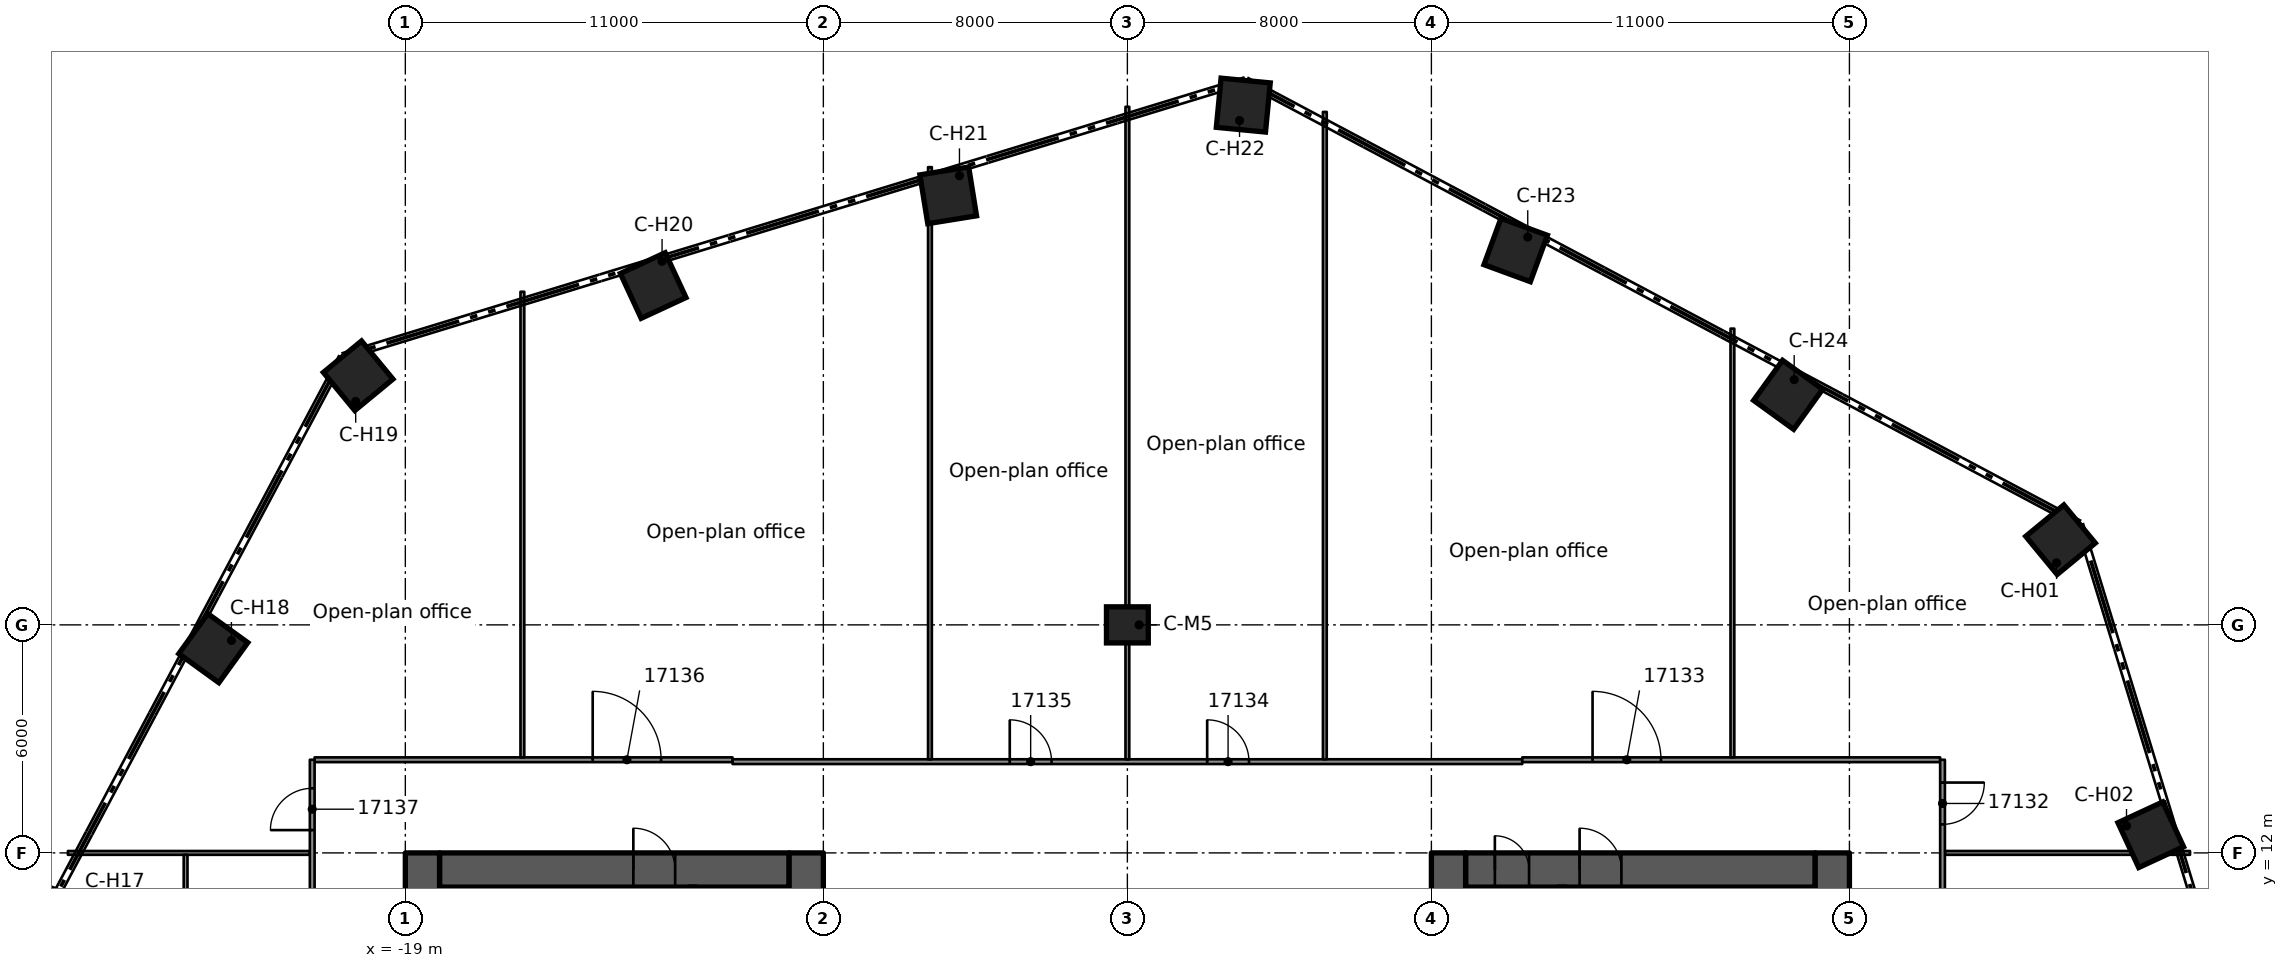
"""IFC4 building model, lengths in metres.
Left out: names, types, materials, properties, quantities, classifications, styles, units other than length and angle.
Written with IfcOpenShell. Run it as: python <this file> out.ifc"""

import sys

from ifc_helpers import new_model, si_unit, direction, frame, frame_2d, origin, origin_2d, place, context, subcontext, project, spatial, rectangle, extrude, element, fill, save


model = new_model("IFC4")
c1 = context("Model", 3, precision=1e-05, world=origin(), true_north=direction((0.0, 1.0)))
c2 = subcontext(c1, "Body", "Model", "MODEL_VIEW")
j1 = project(units=[si_unit("LENGTHUNIT", "METRE"), si_unit("PLANEANGLEUNIT", "RADIAN")], contexts=[c1])
p1 = place(None, origin())
s1 = spatial("IfcSite", under=j1, at=p1, CompositionType="ELEMENT")
p2 = place(p1, origin())
s2 = spatial("IfcBuilding", under=s1, at=p2, CompositionType="ELEMENT")
p3 = place(p2, frame((0.0, 0.0, 84.2)))
s3 = spatial("IfcBuildingStorey", under=s2, at=p3, CompositionType="ELEMENT", Elevation=84.2)
p4 = place(p3, frame((-18.1, 11.55, 0.0), z_axis=(0.0, 0.0, 1.0), x_axis=(1.0, 0.0, 0.0)))
e1 = element("IfcWall", 1, at=p4, inside=s3, PredefinedType="SHEAR", context=c2, shape_type="SweptSolid", body=[
    extrude(rectangle(XDim=9.2, YDim=0.9, at=frame_2d((4.6, 0.0))), origin(), (0.0, 0.0, 1.0), 3.5),
])
p5 = place(p4, frame((5.1, 0.0, 0.0)))
e2 = element("IfcOpeningElement", 2, at=p5, cuts=e1, PredefinedType="OPENING", context=c2, shape_type="SweptSolid", body=[
    extrude(rectangle(XDim=1.1, YDim=2.1, at=frame_2d((0.55, 1.05))), frame((0.0, 0.46, 0.0), z_axis=(0.0, -1.0, 0.0), x_axis=(1.0, 0.0, 0.0)), (0.0, 0.0, 1.0), 0.92),
])
p6 = place(p3, frame((-18.55, -12.0, 0.0), z_axis=(0.0, 0.0, 1.0), x_axis=(0.0, 1.0, 0.0)))
e3 = element("IfcWall", 3, at=p6, inside=s3, PredefinedType="SHEAR", context=c2, shape_type="SweptSolid", body=[
    extrude(rectangle(XDim=24.0, YDim=0.9, at=frame_2d((12.0, 0.0))), origin(), (0.0, 0.0, 1.0), 3.5),
])
p7 = place(p6, frame((10.1, 0.0, 0.0)))
e4 = element("IfcOpeningElement", 4, at=p7, cuts=e3, PredefinedType="OPENING", context=c2, shape_type="SweptSolid", body=[
    extrude(rectangle(XDim=1.8, YDim=2.1, at=frame_2d((0.9, 1.05))), frame((0.0, 0.46, 0.0), z_axis=(0.0, -1.0, 0.0), x_axis=(1.0, 0.0, 0.0)), (0.0, 0.0, 1.0), 0.92),
])
p8 = place(p3, frame((-8.45, -12.0, 0.0), z_axis=(0.0, 0.0, 1.0), x_axis=(0.0, 1.0, 0.0)))
e5 = element("IfcWall", 5, at=p8, inside=s3, PredefinedType="SHEAR", context=c2, shape_type="SweptSolid", body=[
    extrude(rectangle(XDim=24.0, YDim=0.9, at=frame_2d((12.0, 0.0))), origin(), (0.0, 0.0, 1.0), 3.5),
])
p9 = place(p8, frame((9.6, 0.0, 0.0)))
e6 = element("IfcOpeningElement", 6, at=p9, cuts=e5, PredefinedType="OPENING", context=c2, shape_type="SweptSolid", body=[
    extrude(rectangle(XDim=1.8, YDim=2.1, at=frame_2d((0.9, 1.05))), frame((0.0, 0.46, 0.0), z_axis=(0.0, -1.0, 0.0), x_axis=(1.0, 0.0, 0.0)), (0.0, 0.0, 1.0), 0.92),
])
p10 = place(p8, frame((19.65, 0.0, 0.0)))
e7 = element("IfcOpeningElement", 7, at=p10, cuts=e5, PredefinedType="OPENING", context=c2, shape_type="SweptSolid", body=[
    extrude(rectangle(XDim=1.1, YDim=2.1, at=frame_2d((0.55, 1.05))), frame((0.0, 0.46, 0.0), z_axis=(0.0, -1.0, 0.0), x_axis=(1.0, 0.0, 0.0)), (0.0, 0.0, 1.0), 0.92),
])
p11 = place(p3, frame((8.9, 11.55, 0.0), z_axis=(0.0, 0.0, 1.0), x_axis=(1.0, 0.0, 0.0)))
e8 = element("IfcWall", 8, at=p11, inside=s3, PredefinedType="SHEAR", context=c2, shape_type="SweptSolid", body=[
    extrude(rectangle(XDim=9.2, YDim=0.9, at=frame_2d((4.6, 0.0))), origin(), (0.0, 0.0, 1.0), 3.5),
])
p12 = place(p11, frame((3.0, 0.0, 0.0)))
e9 = element("IfcOpeningElement", 9, at=p12, cuts=e8, PredefinedType="OPENING", context=c2, shape_type="SweptSolid", body=[
    extrude(rectangle(XDim=1.1, YDim=2.1, at=frame_2d((0.55, 1.05))), frame((0.0, 0.46, 0.0), z_axis=(0.0, -1.0, 0.0), x_axis=(1.0, 0.0, 0.0)), (0.0, 0.0, 1.0), 0.92),
])
p13 = place(p11, frame((0.77, 0.0, 0.0)))
e10 = element("IfcOpeningElement", 10, at=p13, cuts=e8, PredefinedType="OPENING", context=c2, shape_type="SweptSolid", body=[
    extrude(rectangle(XDim=0.9, YDim=2.1, at=frame_2d((0.45, 1.05))), frame((0.0, 0.46, 0.0), z_axis=(0.0, -1.0, 0.0), x_axis=(1.0, 0.0, 0.0)), (0.0, 0.0, 1.0), 0.92),
])
p14 = place(p3, frame((8.45, -12.0, 0.0), z_axis=(0.0, 0.0, 1.0), x_axis=(0.0, 1.0, 0.0)))
e11 = element("IfcWall", 11, at=p14, inside=s3, PredefinedType="SHEAR", context=c2, shape_type="SweptSolid", body=[
    extrude(rectangle(XDim=24.0, YDim=0.9, at=frame_2d((12.0, 0.0))), origin(), (0.0, 0.0, 1.0), 3.5),
])
p15 = place(p14, frame((12.6, 0.0, 0.0)))
e12 = element("IfcOpeningElement", 12, at=p15, cuts=e11, PredefinedType="OPENING", context=c2, shape_type="SweptSolid", body=[
    extrude(rectangle(XDim=1.8, YDim=2.1, at=frame_2d((0.9, 1.05))), frame((0.0, 0.46, 0.0), z_axis=(0.0, -1.0, 0.0), x_axis=(1.0, 0.0, 0.0)), (0.0, 0.0, 1.0), 0.92),
])
p16 = place(p14, frame((3.25, 0.0, 0.0)))
e13 = element("IfcOpeningElement", 13, at=p16, cuts=e11, PredefinedType="OPENING", context=c2, shape_type="SweptSolid", body=[
    extrude(rectangle(XDim=1.1, YDim=2.1, at=frame_2d((0.55, 1.05))), frame((0.0, 0.46, 0.0), z_axis=(0.0, -1.0, 0.0), x_axis=(1.0, 0.0, 0.0)), (0.0, 0.0, 1.0), 0.92),
])
p17 = place(p3, frame((18.55, -12.0, 0.0), z_axis=(0.0, 0.0, 1.0), x_axis=(0.0, 1.0, 0.0)))
e14 = element("IfcWall", 14, at=p17, inside=s3, PredefinedType="SHEAR", context=c2, shape_type="SweptSolid", body=[
    extrude(rectangle(XDim=24.0, YDim=0.9, at=frame_2d((12.0, 0.0))), origin(), (0.0, 0.0, 1.0), 3.5),
])
p18 = place(p17, frame((12.1, 0.0, 0.0)))
e15 = element("IfcOpeningElement", 15, at=p18, cuts=e14, PredefinedType="OPENING", context=c2, shape_type="SweptSolid", body=[
    extrude(rectangle(XDim=1.8, YDim=2.1, at=frame_2d((0.9, 1.05))), frame((0.0, 0.46, 0.0), z_axis=(0.0, -1.0, 0.0), x_axis=(1.0, 0.0, 0.0)), (0.0, 0.0, 1.0), 0.92),
])
for number, where, z_axis, x_axis in (
    (16, (24.555, 20.241, 0.0), (0.0, 0.0, 1.0), (0.772, 0.636, 0.0)),
    (17, (26.929, 12.478, 0.0), (0.0, 0.0, 1.0), (0.907, 0.42, 0.0)),
    (18, (-24.053, 17.387, 0.0), (0.0, 0.0, 1.0), (-0.81, 0.586, 0.0)),
    (19, (-20.241, 24.555, 0.0), (0.0, 0.0, 1.0), (-0.636, 0.772, 0.0)),
    (20, (-12.478, 26.929, 0.0), (0.0, 0.0, 1.0), (-0.42, 0.907, 0.0)),
    (21, (-4.714, 29.302, 0.0), (0.0, 0.0, 1.0), (-0.159, 0.987, 0.0)),
    (22, (3.05, 31.676, 0.0), (0.0, 0.0, 1.0), (0.096, 0.995, 0.0)),
    (23, (10.218, 27.864, 0.0), (0.0, 0.0, 1.0), (0.344, 0.939, 0.0)),
    (24, (17.387, 24.053, 0.0), (0.0, 0.0, 1.0), (0.586, 0.81, 0.0)),
):
    element("IfcColumn", number, at=place(p3, frame(where, z_axis=z_axis, x_axis=x_axis)), inside=s3, PredefinedType="COLUMN", context=c2, shape_type="SweptSolid", body=[
        extrude(rectangle(XDim=1.3, YDim=1.3, at=origin_2d()), origin(), (0.0, 0.0, 1.0), 3.5),
    ])
p19 = place(p3, frame((0.0, 18.0, 0.0), z_axis=(0.0, 0.0, 1.0), x_axis=(1.0, 0.0, 0.0)))
e25 = element("IfcColumn", 25, at=p19, inside=s3, PredefinedType="COLUMN", context=c2, shape_type="SweptSolid", body=[
    extrude(rectangle(XDim=1.1, YDim=0.95, at=origin_2d()), origin(), (0.0, 0.0, 1.0), 3.5),
])
p20 = place(p3, frame((-11.44, 6.975, 0.0), z_axis=(0.0, 0.0, 1.0), x_axis=(0.0, 1.0, 0.0)))
e26 = element("IfcWall", 26, at=p20, inside=s3, PredefinedType="SOLIDWALL", context=c2, shape_type="SweptSolid", body=[
    extrude(rectangle(XDim=4.125, YDim=0.2, at=frame_2d((2.062, 0.0))), origin(), (0.0, 0.0, 1.0), 3.09),
])
p21 = place(p20, frame((2.1, 0.0, 0.0)))
e27 = element("IfcOpeningElement", 27, at=p21, cuts=e26, PredefinedType="OPENING", context=c2, shape_type="SweptSolid", body=[
    extrude(rectangle(XDim=1.1, YDim=2.1, at=frame_2d((0.55, 1.05))), frame((0.0, 0.11, 0.0), z_axis=(0.0, -1.0, 0.0), x_axis=(1.0, 0.0, 0.0)), (0.0, 0.0, 1.0), 0.22),
])
p22 = place(p3, frame((11.44, 11.1, 0.0), z_axis=(0.0, 0.0, 1.0), x_axis=(0.0, -1.0, 0.0)))
e28 = element("IfcWall", 28, at=p22, inside=s3, PredefinedType="SOLIDWALL", context=c2, shape_type="SweptSolid", body=[
    extrude(rectangle(XDim=4.125, YDim=0.2, at=frame_2d((2.062, 0.0))), origin(), (0.0, 0.0, 1.0), 3.09),
])
p23 = place(p3, frame((-27.879, 12.0, 0.0), z_axis=(0.0, 0.0, 1.0), x_axis=(1.0, 0.0, 0.0)))
e29 = element("IfcWall", 29, at=p23, inside=s3, PredefinedType="PARTITIONING", context=c2, shape_type="SweptSolid", body=[
    extrude(rectangle(XDim=6.367, YDim=0.1, at=frame_2d((3.184, 0.0))), origin(), (0.0, 0.0, 1.0), 3.08),
])
p24 = place(p3, frame((21.512, 12.0, 0.0), z_axis=(0.0, 0.0, 1.0), x_axis=(1.0, 0.0, 0.0)))
e30 = element("IfcWall", 30, at=p24, inside=s3, PredefinedType="PARTITIONING", context=c2, shape_type="SweptSolid", body=[
    extrude(rectangle(XDim=6.451, YDim=0.1, at=frame_2d((3.226, 0.0))), origin(), (0.0, 0.0, 1.0), 3.08),
])
p25 = place(p3, frame((-10.39, 14.401, 0.0), z_axis=(0.0, 0.0, 1.0), x_axis=(1.0, 0.0, 0.0)))
e31 = element("IfcWall", 31, at=p25, inside=s3, PredefinedType="PARTITIONING", context=c2, shape_type="SweptSolid", body=[
    extrude(rectangle(XDim=20.781, YDim=0.125, at=frame_2d((10.391, 0.0))), origin(), (0.0, 0.0, 1.0), 3.08),
])
p26 = place(p25, frame((12.49, 0.0, 0.0)))
e32 = element("IfcOpeningElement", 32, at=p26, cuts=e31, PredefinedType="OPENING", context=c2, shape_type="SweptSolid", body=[
    extrude(rectangle(XDim=1.1, YDim=2.1, at=frame_2d((0.55, 1.05))), frame((0.0, 0.073, 0.0), z_axis=(0.0, -1.0, 0.0), x_axis=(1.0, 0.0, 0.0)), (0.0, 0.0, 1.0), 0.145),
])
p27 = place(p25, frame((7.295, 0.0, 0.0)))
e33 = element("IfcOpeningElement", 33, at=p27, cuts=e31, PredefinedType="OPENING", context=c2, shape_type="SweptSolid", body=[
    extrude(rectangle(XDim=1.1, YDim=2.1, at=frame_2d((0.55, 1.05))), frame((0.0, 0.073, 0.0), z_axis=(0.0, -1.0, 0.0), x_axis=(1.0, 0.0, 0.0)), (0.0, 0.0, 1.0), 0.145),
])
p28 = place(p3, frame((-21.387, 14.451, 0.0), z_axis=(0.0, 0.0, 1.0), x_axis=(1.0, 0.0, 0.0)))
e34 = element("IfcWall", 34, at=p28, inside=s3, PredefinedType="PARTITIONING", context=c2, shape_type="SweptSolid", body=[
    extrude(rectangle(XDim=10.996, YDim=0.125, at=frame_2d((5.498, 0.0))), origin(), (0.0, 0.0, 1.0), 3.08),
])
p29 = place(p28, frame((7.317, 0.0, 0.0)))
e35 = element("IfcOpeningElement", 35, at=p29, cuts=e34, PredefinedType="OPENING", context=c2, shape_type="SweptSolid", body=[
    extrude(rectangle(XDim=1.8, YDim=2.1, at=frame_2d((0.9, 1.05))), frame((0.0, 0.073, 0.0), z_axis=(0.0, -1.0, 0.0), x_axis=(1.0, 0.0, 0.0)), (0.0, 0.0, 1.0), 0.145),
])
p30 = place(p3, frame((10.391, 14.451, 0.0), z_axis=(0.0, 0.0, 1.0), x_axis=(1.0, 0.0, 0.0)))
e36 = element("IfcWall", 36, at=p30, inside=s3, PredefinedType="PARTITIONING", context=c2, shape_type="SweptSolid", body=[
    extrude(rectangle(XDim=10.996, YDim=0.125, at=frame_2d((5.498, 0.0))), origin(), (0.0, 0.0, 1.0), 3.08),
])
p31 = place(p30, frame((1.85, 0.0, 0.0)))
e37 = element("IfcOpeningElement", 37, at=p31, cuts=e36, PredefinedType="OPENING", context=c2, shape_type="SweptSolid", body=[
    extrude(rectangle(XDim=1.8, YDim=2.1, at=frame_2d((0.9, 1.05))), frame((0.0, 0.073, 0.0), z_axis=(0.0, -1.0, 0.0), x_axis=(1.0, 0.0, 0.0)), (0.0, 0.0, 1.0), 0.145),
])
p32 = place(p3, frame((21.45, 14.451, 0.0), z_axis=(0.0, 0.0, 1.0), x_axis=(0.0, -1.0, 0.0)))
e38 = element("IfcWall", 38, at=p32, inside=s3, PredefinedType="PARTITIONING", context=c2, shape_type="SweptSolid", body=[
    extrude(rectangle(XDim=17.904, YDim=0.125, at=frame_2d((8.952, 0.0))), origin(), (0.0, 0.0, 1.0), 3.08),
])
p33 = place(p32, frame((9.301, 0.0, 0.0)))
e39 = element("IfcOpeningElement", 39, at=p33, cuts=e38, PredefinedType="OPENING", context=c2, shape_type="SweptSolid", body=[
    extrude(rectangle(XDim=1.8, YDim=2.1, at=frame_2d((0.9, 1.05))), frame((0.0, 0.073, 0.0), z_axis=(0.0, -1.0, 0.0), x_axis=(1.0, 0.0, 0.0)), (0.0, 0.0, 1.0), 0.145),
])
p34 = place(p32, frame((0.6, 0.0, 0.0)))
e40 = element("IfcOpeningElement", 40, at=p34, cuts=e38, PredefinedType="OPENING", context=c2, shape_type="SweptSolid", body=[
    extrude(rectangle(XDim=1.1, YDim=2.1, at=frame_2d((0.55, 1.05))), frame((0.0, 0.073, 0.0), z_axis=(0.0, -1.0, 0.0), x_axis=(1.0, 0.0, 0.0)), (0.0, 0.0, 1.0), 0.145),
])
p35 = place(p3, frame((15.921, 14.514, 0.0), z_axis=(0.0, 0.0, 1.0), x_axis=(0.0, 1.0, 0.0)))
e41 = element("IfcWall", 41, at=p35, inside=s3, PredefinedType="PARTITIONING", context=c2, shape_type="SweptSolid", body=[
    extrude(rectangle(XDim=11.281, YDim=0.1, at=frame_2d((5.641, 0.0))), origin(), (0.0, 0.0, 1.0), 3.08),
])
p36 = place(p3, frame((5.196, 14.463, 0.0), z_axis=(0.0, 0.0, 1.0), x_axis=(0.0, 1.0, 0.0)))
e42 = element("IfcWall", 42, at=p36, inside=s3, PredefinedType="PARTITIONING", context=c2, shape_type="SweptSolid", body=[
    extrude(rectangle(XDim=17.034, YDim=0.1, at=frame_2d((8.517, 0.0))), origin(), (0.0, 0.0, 1.0), 3.08),
])
p37 = place(p3, frame((0.0, 14.463, 0.0), z_axis=(0.0, 0.0, 1.0), x_axis=(0.0, 1.0, 0.0)))
e43 = element("IfcWall", 43, at=p37, inside=s3, PredefinedType="PARTITIONING", context=c2, shape_type="SweptSolid", body=[
    extrude(rectangle(XDim=17.169, YDim=0.1, at=frame_2d((8.584, 0.0))), origin(), (0.0, 0.0, 1.0), 3.08),
])
p38 = place(p3, frame((-5.195, 14.463, 0.0), z_axis=(0.0, 0.0, 1.0), x_axis=(0.0, 1.0, 0.0)))
e44 = element("IfcWall", 44, at=p38, inside=s3, PredefinedType="PARTITIONING", context=c2, shape_type="SweptSolid", body=[
    extrude(rectangle(XDim=15.581, YDim=0.1, at=frame_2d((7.791, 0.0))), origin(), (0.0, 0.0, 1.0), 3.08),
])
p39 = place(p3, frame((-15.92, 14.514, 0.0), z_axis=(0.0, 0.0, 1.0), x_axis=(0.0, 1.0, 0.0)))
e45 = element("IfcWall", 45, at=p39, inside=s3, PredefinedType="PARTITIONING", context=c2, shape_type="SweptSolid", body=[
    extrude(rectangle(XDim=12.251, YDim=0.1, at=frame_2d((6.125, 0.0))), origin(), (0.0, 0.0, 1.0), 3.08),
])
p40 = place(p3, frame((-21.45, -14.444, 0.0), z_axis=(0.0, 0.0, 1.0), x_axis=(0.0, 1.0, 0.0)))
e46 = element("IfcWall", 46, at=p40, inside=s3, PredefinedType="PARTITIONING", context=c2, shape_type="SweptSolid", body=[
    extrude(rectangle(XDim=28.895, YDim=0.125, at=frame_2d((14.448, 0.0))), origin(), (0.0, 0.0, 1.0), 3.08),
])
p41 = place(p40, frame((11.044, 0.0, 0.0)))
e47 = element("IfcOpeningElement", 47, at=p41, cuts=e46, PredefinedType="OPENING", context=c2, shape_type="SweptSolid", body=[
    extrude(rectangle(XDim=0.9, YDim=2.1, at=frame_2d((0.45, 1.05))), frame((0.0, 0.073, 0.0), z_axis=(0.0, -1.0, 0.0), x_axis=(1.0, 0.0, 0.0)), (0.0, 0.0, 1.0), 0.145),
])
p42 = place(p40, frame((27.044, 0.0, 0.0)))
e48 = element("IfcOpeningElement", 48, at=p42, cuts=e46, PredefinedType="OPENING", context=c2, shape_type="SweptSolid", body=[
    extrude(rectangle(XDim=1.1, YDim=2.1, at=frame_2d((0.55, 1.05))), frame((0.0, 0.073, 0.0), z_axis=(0.0, -1.0, 0.0), x_axis=(1.0, 0.0, 0.0)), (0.0, 0.0, 1.0), 0.145),
])
p43 = place(p40, frame((22.795, 0.0, 0.0)))
e49 = element("IfcOpeningElement", 49, at=p43, cuts=e46, PredefinedType="OPENING", context=c2, shape_type="SweptSolid", body=[
    extrude(rectangle(XDim=1.1, YDim=2.1, at=frame_2d((0.55, 1.05))), frame((0.0, 0.073, 0.0), z_axis=(0.0, -1.0, 0.0), x_axis=(1.0, 0.0, 0.0)), (0.0, 0.0, 1.0), 0.145),
])
p44 = place(p3, frame((-24.782, 6.001, 0.0), z_axis=(0.0, 0.0, 1.0), x_axis=(0.0, 1.0, 0.0)))
e50 = element("IfcWall", 50, at=p44, inside=s3, PredefinedType="PARTITIONING", context=c2, shape_type="SweptSolid", body=[
    extrude(rectangle(XDim=5.949, YDim=0.1, at=frame_2d((2.975, 0.0))), origin(), (0.0, 0.0, 1.0), 3.08),
])
p45 = place(p5, origin())
e51 = element("IfcDoor", 51, at=p45, inside=s3, OperationType="SINGLE_SWING_RIGHT", PredefinedType="DOOR", context=c2, shape_type="SweptSolid", body=[
    extrude(rectangle(XDim=1.1, YDim=2.1, at=frame_2d((0.55, 1.05))), frame((0.0, 0.025, 0.0), z_axis=(0.0, -1.0, 0.0), x_axis=(1.0, 0.0, 0.0)), (0.0, 0.0, 1.0), 0.05),
])
fill(e2, e51)
p46 = place(p12, origin())
e52 = element("IfcDoor", 52, at=p46, inside=s3, OperationType="SINGLE_SWING_LEFT", PredefinedType="DOOR", context=c2, shape_type="SweptSolid", body=[
    extrude(rectangle(XDim=1.1, YDim=2.1, at=frame_2d((0.55, 1.05))), frame((0.0, 0.025, 0.0), z_axis=(0.0, -1.0, 0.0), x_axis=(1.0, 0.0, 0.0)), (0.0, 0.0, 1.0), 0.05),
])
fill(e9, e52)
p47 = place(p13, origin())
e53 = element("IfcDoor", 53, at=p47, inside=s3, OperationType="SINGLE_SWING_LEFT", PredefinedType="DOOR", context=c2, shape_type="SweptSolid", body=[
    extrude(rectangle(XDim=0.9, YDim=2.1, at=frame_2d((0.45, 1.05))), frame((0.0, 0.025, 0.0), z_axis=(0.0, -1.0, 0.0), x_axis=(1.0, 0.0, 0.0)), (0.0, 0.0, 1.0), 0.05),
])
fill(e10, e53)
p48 = place(p34, origin())
e54 = element("IfcDoor", 54, at=p48, inside=s3, OperationType="SINGLE_SWING_LEFT", PredefinedType="DOOR", context=c2, shape_type="SweptSolid", body=[
    extrude(rectangle(XDim=1.1, YDim=2.1, at=frame_2d((0.55, 1.05))), frame((0.0, 0.025, 0.0), z_axis=(0.0, -1.0, 0.0), x_axis=(1.0, 0.0, 0.0)), (0.0, 0.0, 1.0), 0.05),
])
fill(e40, e54)
p49 = place(p31, origin())
e55 = element("IfcDoor", 55, at=p49, inside=s3, OperationType="DOUBLE_DOOR_SINGLE_SWING", PredefinedType="DOOR", context=c2, shape_type="SweptSolid", body=[
    extrude(rectangle(XDim=1.8, YDim=2.1, at=frame_2d((0.9, 1.05))), frame((0.0, 0.025, 0.0), z_axis=(0.0, -1.0, 0.0), x_axis=(1.0, 0.0, 0.0)), (0.0, 0.0, 1.0), 0.05),
])
fill(e37, e55)
p50 = place(p26, origin())
e56 = element("IfcDoor", 56, at=p50, inside=s3, OperationType="SINGLE_SWING_RIGHT", PredefinedType="DOOR", context=c2, shape_type="SweptSolid", body=[
    extrude(rectangle(XDim=1.1, YDim=2.1, at=frame_2d((0.55, 1.05))), frame((0.0, 0.025, 0.0), z_axis=(0.0, -1.0, 0.0), x_axis=(1.0, 0.0, 0.0)), (0.0, 0.0, 1.0), 0.05),
])
fill(e32, e56)
p51 = place(p27, origin())
e57 = element("IfcDoor", 57, at=p51, inside=s3, OperationType="SINGLE_SWING_LEFT", PredefinedType="DOOR", context=c2, shape_type="SweptSolid", body=[
    extrude(rectangle(XDim=1.1, YDim=2.1, at=frame_2d((0.55, 1.05))), frame((0.0, 0.025, 0.0), z_axis=(0.0, -1.0, 0.0), x_axis=(1.0, 0.0, 0.0)), (0.0, 0.0, 1.0), 0.05),
])
fill(e33, e57)
p52 = place(p29, origin())
e58 = element("IfcDoor", 58, at=p52, inside=s3, OperationType="DOUBLE_DOOR_SINGLE_SWING", PredefinedType="DOOR", context=c2, shape_type="SweptSolid", body=[
    extrude(rectangle(XDim=1.8, YDim=2.1, at=frame_2d((0.9, 1.05))), frame((0.0, 0.025, 0.0), z_axis=(0.0, -1.0, 0.0), x_axis=(1.0, 0.0, 0.0)), (0.0, 0.0, 1.0), 0.05),
])
fill(e35, e58)
p53 = place(p42, origin())
e59 = element("IfcDoor", 59, at=p53, inside=s3, OperationType="SINGLE_SWING_RIGHT", PredefinedType="DOOR", context=c2, shape_type="SweptSolid", body=[
    extrude(rectangle(XDim=1.1, YDim=2.1, at=frame_2d((0.55, 1.05))), frame((0.0, 0.025, 0.0), z_axis=(0.0, -1.0, 0.0), x_axis=(1.0, 0.0, 0.0)), (0.0, 0.0, 1.0), 0.05),
])
fill(e48, e59)
save(model, sys.argv[1])
